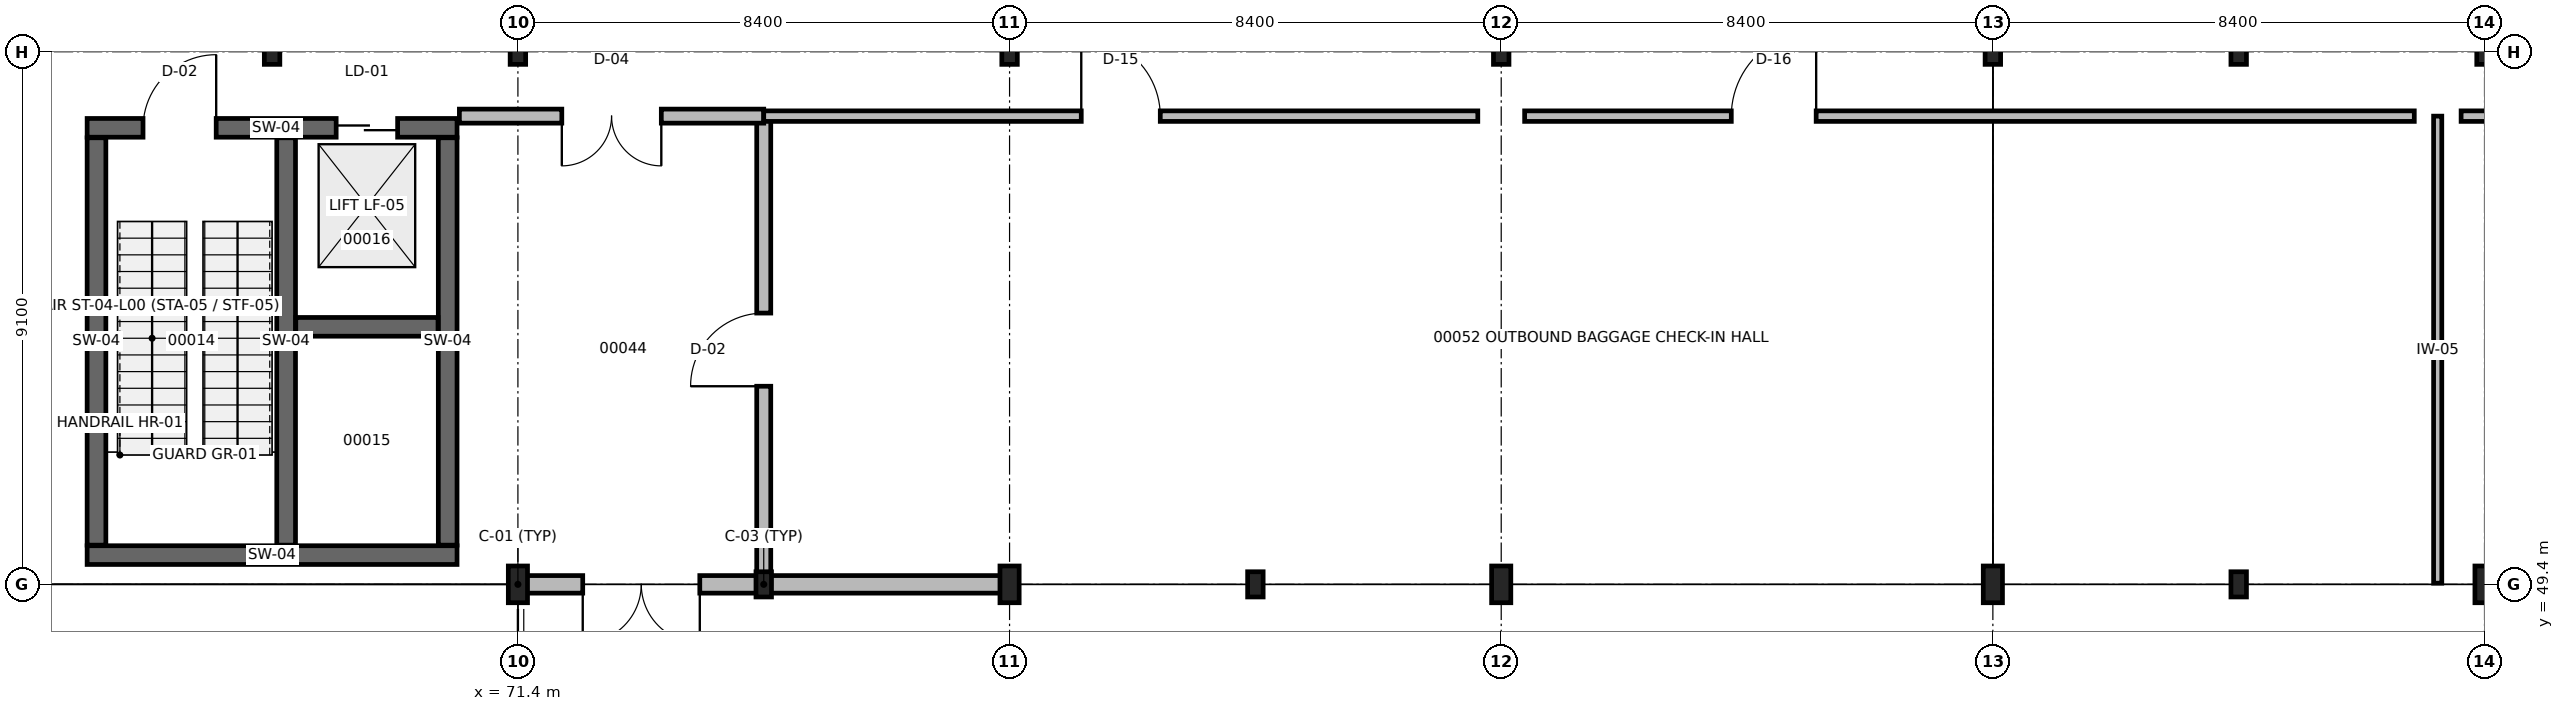
"""IFC4 building model, lengths in metres.
Left out: names, types, materials, properties, quantities, classifications, styles, units other than length and angle.
Written with IfcOpenShell. Run it as: python <this file> out.ifc"""

import sys

from ifc_helpers import new_model, si_unit, direction, frame, frame_2d, origin, origin_2d, place, context, subcontext, project, spatial, rectangle, i_section, extrude, element, fill, save


model = new_model("IFC4")
c1 = context("Model", 3, precision=1e-05, world=origin(), true_north=direction((0.0, 1.0)))
c2 = subcontext(c1, "Body", "Model", "MODEL_VIEW")
j1 = project(units=[si_unit("LENGTHUNIT", "METRE"), si_unit("PLANEANGLEUNIT", "RADIAN")], contexts=[c1])
p1 = place(None, origin())
s1 = spatial("IfcSite", under=j1, at=p1, CompositionType="ELEMENT")
p2 = place(p1, origin())
s2 = spatial("IfcBuilding", under=s1, at=p2, CompositionType="ELEMENT")
p3 = place(p2, origin())
s3 = spatial("IfcBuildingStorey", under=s2, at=p3, CompositionType="ELEMENT", Elevation=0.0)
p4 = place(p3, frame((71.4, 49.4, 0.0), z_axis=(0.0, 0.0, 1.0), x_axis=(1.0, 0.0, 0.0)))
e1 = element("IfcColumn", 1, at=p4, inside=s3, PredefinedType="COLUMN", context=c2, shape_type="SweptSolid", body=[
    extrude(i_section(OverallWidth=0.328, OverallDepth=0.628, WebThickness=0.017, FlangeThickness=0.028, at=origin_2d()), origin(), (0.0, 0.0, 1.0), 5.1),
])
p5 = place(p3, frame((71.4, 58.5, 0.0), z_axis=(0.0, 0.0, 1.0), x_axis=(1.0, 0.0, 0.0)))
e2 = element("IfcColumn", 2, at=p5, inside=s3, PredefinedType="COLUMN", context=c2, shape_type="SweptSolid", body=[
    extrude(i_section(OverallWidth=0.265, OverallDepth=0.431, WebThickness=0.015, FlangeThickness=0.025, at=origin_2d()), origin(), (0.0, 0.0, 1.0), 5.1),
])
p6 = place(p3, frame((79.8, 49.4, 0.0), z_axis=(0.0, 0.0, 1.0), x_axis=(1.0, 0.0, 0.0)))
e3 = element("IfcColumn", 3, at=p6, inside=s3, PredefinedType="COLUMN", context=c2, shape_type="SweptSolid", body=[
    extrude(i_section(OverallWidth=0.328, OverallDepth=0.628, WebThickness=0.017, FlangeThickness=0.028, at=origin_2d()), origin(), (0.0, 0.0, 1.0), 5.1),
])
p7 = place(p3, frame((79.8, 58.5, 0.0), z_axis=(0.0, 0.0, 1.0), x_axis=(1.0, 0.0, 0.0)))
e4 = element("IfcColumn", 4, at=p7, inside=s3, PredefinedType="COLUMN", context=c2, shape_type="SweptSolid", body=[
    extrude(i_section(OverallWidth=0.265, OverallDepth=0.431, WebThickness=0.015, FlangeThickness=0.025, at=origin_2d()), origin(), (0.0, 0.0, 1.0), 5.1),
])
p8 = place(p3, frame((88.2, 49.4, 0.0), z_axis=(0.0, 0.0, 1.0), x_axis=(1.0, 0.0, 0.0)))
e5 = element("IfcColumn", 5, at=p8, inside=s3, PredefinedType="COLUMN", context=c2, shape_type="SweptSolid", body=[
    extrude(i_section(OverallWidth=0.328, OverallDepth=0.628, WebThickness=0.017, FlangeThickness=0.028, at=origin_2d()), origin(), (0.0, 0.0, 1.0), 5.1),
])
p9 = place(p3, frame((88.2, 58.5, 0.0), z_axis=(0.0, 0.0, 1.0), x_axis=(1.0, 0.0, 0.0)))
e6 = element("IfcColumn", 6, at=p9, inside=s3, PredefinedType="COLUMN", context=c2, shape_type="SweptSolid", body=[
    extrude(i_section(OverallWidth=0.265, OverallDepth=0.431, WebThickness=0.015, FlangeThickness=0.025, at=origin_2d()), origin(), (0.0, 0.0, 1.0), 5.1),
])
p10 = place(p3, frame((96.6, 49.4, 0.0), z_axis=(0.0, 0.0, 1.0), x_axis=(1.0, 0.0, 0.0)))
e7 = element("IfcColumn", 7, at=p10, inside=s3, PredefinedType="COLUMN", context=c2, shape_type="SweptSolid", body=[
    extrude(i_section(OverallWidth=0.328, OverallDepth=0.628, WebThickness=0.017, FlangeThickness=0.028, at=origin_2d()), origin(), (0.0, 0.0, 1.0), 5.1),
])
p11 = place(p3, frame((96.6, 58.5, 0.0), z_axis=(0.0, 0.0, 1.0), x_axis=(1.0, 0.0, 0.0)))
e8 = element("IfcColumn", 8, at=p11, inside=s3, PredefinedType="COLUMN", context=c2, shape_type="SweptSolid", body=[
    extrude(i_section(OverallWidth=0.265, OverallDepth=0.431, WebThickness=0.015, FlangeThickness=0.025, at=origin_2d()), origin(), (0.0, 0.0, 1.0), 5.1),
])
p12 = place(p3, frame((105.0, 49.4, 0.0), z_axis=(0.0, 0.0, 1.0), x_axis=(1.0, 0.0, 0.0)))
e9 = element("IfcColumn", 9, at=p12, inside=s3, PredefinedType="COLUMN", context=c2, shape_type="SweptSolid", body=[
    extrude(i_section(OverallWidth=0.328, OverallDepth=0.628, WebThickness=0.017, FlangeThickness=0.028, at=origin_2d()), origin(), (0.0, 0.0, 1.0), 5.1),
])
for number, where, z_axis, x_axis in (
    (10, (105.0, 58.5, 0.0), (0.0, 0.0, 1.0), (1.0, 0.0, 0.0)),
    (11, (67.2, 58.5, 0.0), (0.0, 0.0, 1.0), (1.0, 0.0, 0.0)),
    (12, (75.6, 49.4, 0.0), (0.0, 0.0, 1.0), (1.0, 0.0, 0.0)),
    (13, (84.0, 49.4, 0.0), (0.0, 0.0, 1.0), (1.0, 0.0, 0.0)),
    (14, (100.8, 49.4, 0.0), (0.0, 0.0, 1.0), (1.0, 0.0, 0.0)),
    (15, (100.8, 58.5, 0.0), (0.0, 0.0, 1.0), (1.0, 0.0, 0.0)),
):
    element("IfcColumn", number, at=place(p3, frame(where, z_axis=z_axis, x_axis=x_axis)), inside=s3, PredefinedType="COLUMN", context=c2, shape_type="SweptSolid", body=[
        extrude(i_section(OverallWidth=0.265, OverallDepth=0.431, WebThickness=0.015, FlangeThickness=0.025, at=origin_2d()), origin(), (0.0, 0.0, 1.0), 5.1),
    ])
p13 = place(p3, frame((79.785, 49.4, 0.0), z_axis=(0.0, 0.0, 1.0), x_axis=(-1.0, 0.0, 0.0)))
e16 = element("IfcWall", 16, at=p13, inside=s3, PredefinedType="SOLIDWALL", context=c2, shape_type="SweptSolid", body=[
    extrude(rectangle(XDim=8.37, YDim=0.3, at=frame_2d((4.185, 0.0))), origin(), (0.0, 0.0, 1.0), 4.258),
])
p14 = place(p13, frame((5.278, 0.0, 0.0)))
e17 = element("IfcOpeningElement", 17, at=p14, cuts=e16, PredefinedType="OPENING", context=c2, shape_type="SweptSolid", body=[
    extrude(rectangle(XDim=2.0, YDim=2.4, at=frame_2d((1.0, 1.2))), frame((0.0, 0.16, 0.0), z_axis=(0.0, -1.0, 0.0), x_axis=(1.0, 0.0, 0.0)), (0.0, 0.0, 1.0), 0.32),
])
p15 = place(p3, frame((64.04, 49.9, 0.0), z_axis=(0.0, 0.0, 1.0), x_axis=(1.0, 0.0, 0.0)))
e18 = element("IfcWall", 18, at=p15, inside=s3, PredefinedType="SHEAR", context=c2, shape_type="SweptSolid", body=[
    extrude(rectangle(XDim=6.32, YDim=0.32, at=frame_2d((3.16, 0.0))), origin(), (0.0, 0.0, 1.0), 4.82),
])
p16 = place(p3, frame((64.04, 57.2, 0.0), z_axis=(0.0, 0.0, 1.0), x_axis=(1.0, 0.0, 0.0)))
e19 = element("IfcWall", 19, at=p16, inside=s3, PredefinedType="SHEAR", context=c2, shape_type="SweptSolid", body=[
    extrude(rectangle(XDim=6.32, YDim=0.32, at=frame_2d((3.16, 0.0))), origin(), (0.0, 0.0, 1.0), 4.82),
])
p17 = place(p16, frame((0.955, 0.0, 0.0)))
e20 = element("IfcOpeningElement", 20, at=p17, cuts=e19, PredefinedType="OPENING", context=c2, shape_type="SweptSolid", body=[
    extrude(rectangle(XDim=1.25, YDim=2.2, at=frame_2d((0.625, 1.1))), frame((0.0, 0.17, 0.0), z_axis=(0.0, -1.0, 0.0), x_axis=(1.0, 0.0, 0.0)), (0.0, 0.0, 1.0), 0.34),
])
p18 = place(p16, frame((4.255, 0.0, 0.0)))
e21 = element("IfcOpeningElement", 21, at=p18, cuts=e19, PredefinedType="OPENING", context=c2, shape_type="SweptSolid", body=[
    extrude(rectangle(XDim=1.05, YDim=2.15, at=frame_2d((0.525, 1.075))), frame((0.0, 0.17, 0.0), z_axis=(0.0, -1.0, 0.0), x_axis=(1.0, 0.0, 0.0)), (0.0, 0.0, 1.0), 0.34),
])
for number, where, z_axis, x_axis in (
    (22, (64.2, 50.07, 0.0), (0.0, 0.0, 1.0), (0.0, 1.0, 0.0)),
    (23, (70.2, 50.07, 0.0), (0.0, 0.0, 1.0), (0.0, 1.0, 0.0)),
    (24, (67.44, 50.07, 0.0), (0.0, 0.0, 1.0), (0.0, 1.0, 0.0)),
):
    element("IfcWall", number, at=place(p3, frame(where, z_axis=z_axis, x_axis=x_axis)), inside=s3, PredefinedType="SHEAR", context=c2, shape_type="SweptSolid", body=[
        extrude(rectangle(XDim=6.96, YDim=0.32, at=frame_2d((3.48, 0.0))), origin(), (0.0, 0.0, 1.0), 4.82),
    ])
p19 = place(p3, frame((67.605, 53.8, 0.0), z_axis=(0.0, 0.0, 1.0), x_axis=(1.0, 0.0, 0.0)))
e25 = element("IfcWall", 25, at=p19, inside=s3, PredefinedType="SHEAR", context=c2, shape_type="SweptSolid", body=[
    extrude(rectangle(XDim=2.43, YDim=0.32, at=frame_2d((1.215, 0.0))), origin(), (0.0, 0.0, 1.0), 4.82),
])
p20 = place(p3, frame((75.6, 49.42, 0.0), z_axis=(0.0, 0.0, 1.0), x_axis=(0.0, 1.0, 0.0)))
e26 = element("IfcWall", 26, at=p20, inside=s3, PredefinedType="SOLIDWALL", context=c2, shape_type="SweptSolid", body=[
    extrude(rectangle(XDim=7.98, YDim=0.24, at=frame_2d((3.99, 0.0))), origin(), (0.0, 0.0, 1.0), 4.258),
])
p21 = place(p20, frame((3.365, 0.0, 0.0)))
e27 = element("IfcOpeningElement", 27, at=p21, cuts=e26, PredefinedType="OPENING", context=c2, shape_type="SweptSolid", body=[
    extrude(rectangle(XDim=1.25, YDim=2.2, at=frame_2d((0.625, 1.1))), frame((0.0, 0.13, 0.0), z_axis=(0.0, -1.0, 0.0), x_axis=(1.0, 0.0, 0.0)), (0.0, 0.0, 1.0), 0.26),
])
p22 = place(p3, frame((70.4, 57.4, 0.0), z_axis=(0.0, 0.0, 1.0), x_axis=(1.0, 0.0, 0.0)))
e28 = element("IfcWall", 28, at=p22, inside=s3, PredefinedType="SOLIDWALL", context=c2, shape_type="SweptSolid", body=[
    extrude(rectangle(XDim=5.2, YDim=0.24, at=frame_2d((2.6, 0.0))), origin(), (0.0, 0.0, 1.0), 4.102),
])
p23 = place(p22, frame((1.75, 0.0, 0.0)))
e29 = element("IfcOpeningElement", 29, at=p23, cuts=e28, PredefinedType="OPENING", context=c2, shape_type="SweptSolid", body=[
    extrude(rectangle(XDim=1.7, YDim=2.25, at=frame_2d((0.85, 1.125))), frame((0.0, 0.13, 0.0), z_axis=(0.0, -1.0, 0.0), x_axis=(1.0, 0.0, 0.0)), (0.0, 0.0, 1.0), 0.26),
])
p24 = place(p3, frame((75.6, 57.4, 0.0), z_axis=(0.0, 0.0, 1.0), x_axis=(1.0, 0.0, 0.0)))
e30 = element("IfcWall", 30, at=p24, inside=s3, PredefinedType="PARTITIONING", context=c2, shape_type="SweptSolid", body=[
    extrude(rectangle(XDim=12.2, YDim=0.18, at=frame_2d((6.1, 0.0))), origin(), (0.0, 0.0, 1.0), 4.102),
])
p25 = place(p24, frame((5.425, 0.0, 0.0)))
e31 = element("IfcOpeningElement", 31, at=p25, cuts=e30, PredefinedType="OPENING", context=c2, shape_type="SweptSolid", body=[
    extrude(rectangle(XDim=1.35, YDim=2.2, at=frame_2d((0.675, 1.1))), frame((0.0, 0.1, 0.0), z_axis=(0.0, -1.0, 0.0), x_axis=(1.0, 0.0, 0.0)), (0.0, 0.0, 1.0), 0.2),
])
p26 = place(p3, frame((88.6, 57.4, 0.0), z_axis=(0.0, 0.0, 1.0), x_axis=(1.0, 0.0, 0.0)))
e32 = element("IfcWall", 32, at=p26, inside=s3, PredefinedType="PARTITIONING", context=c2, shape_type="SweptSolid", body=[
    extrude(rectangle(XDim=15.2, YDim=0.18, at=frame_2d((7.6, 0.0))), origin(), (0.0, 0.0, 1.0), 4.102),
])
p27 = place(p26, frame((3.531, 0.0, 0.0)))
e33 = element("IfcOpeningElement", 33, at=p27, cuts=e32, PredefinedType="OPENING", context=c2, shape_type="SweptSolid", body=[
    extrude(rectangle(XDim=1.45, YDim=2.25, at=frame_2d((0.725, 1.125))), frame((0.0, 0.1, 0.0), z_axis=(0.0, -1.0, 0.0), x_axis=(1.0, 0.0, 0.0)), (0.0, 0.0, 1.0), 0.2),
])
p28 = place(p3, frame((104.6, 57.4, 0.0), z_axis=(0.0, 0.0, 1.0), x_axis=(1.0, 0.0, 0.0)))
e34 = element("IfcWall", 34, at=p28, inside=s3, PredefinedType="PARTITIONING", context=c2, shape_type="SweptSolid", body=[
    extrude(rectangle(XDim=16.8, YDim=0.18, at=frame_2d((8.4, 0.0))), origin(), (0.0, 0.0, 1.0), 4.102),
])
p29 = place(p28, frame((9.945, 0.0, 0.0)))
e35 = element("IfcOpeningElement", 35, at=p29, cuts=e34, PredefinedType="OPENING", context=c2, shape_type="SweptSolid", body=[
    extrude(rectangle(XDim=1.95, YDim=2.35, at=frame_2d((0.975, 1.175))), frame((0.0, 0.1, 0.0), z_axis=(0.0, -1.0, 0.0), x_axis=(1.0, 0.0, 0.0)), (0.0, 0.0, 1.0), 0.2),
])
p30 = place(p3, frame((104.2, 49.42, 0.0), z_axis=(0.0, 0.0, 1.0), x_axis=(0.0, 1.0, 0.0)))
e36 = element("IfcWall", 36, at=p30, inside=s3, PredefinedType="PARTITIONING", context=c2, shape_type="SweptSolid", body=[
    extrude(rectangle(XDim=7.98, YDim=0.14, at=frame_2d((3.99, 0.0))), origin(), (0.0, 0.0, 1.0), 4.72),
])
p31 = place(p14, origin())
e37 = element("IfcDoor", 37, at=p31, inside=s3, OperationType="DOUBLE_DOOR_SINGLE_SWING", PredefinedType="DOOR", context=c2, shape_type="SweptSolid", body=[
    extrude(rectangle(XDim=2.0, YDim=2.4, at=frame_2d((1.0, 1.2))), frame((0.0, 0.025, 0.0), z_axis=(0.0, -1.0, 0.0), x_axis=(1.0, 0.0, 0.0)), (0.0, 0.0, 1.0), 0.05),
])
fill(e17, e37)
p32 = place(p17, origin())
e38 = element("IfcDoor", 38, at=p32, inside=s3, OperationType="SINGLE_SWING_RIGHT", PredefinedType="DOOR", context=c2, shape_type="SweptSolid", body=[
    extrude(rectangle(XDim=1.25, YDim=2.2, at=frame_2d((0.625, 1.1))), frame((0.0, 0.025, 0.0), z_axis=(0.0, -1.0, 0.0), x_axis=(1.0, 0.0, 0.0)), (0.0, 0.0, 1.0), 0.05),
])
fill(e20, e38)
p33 = place(p18, origin())
e39 = element("IfcDoor", 39, at=p33, inside=s3, OperationType="DOUBLE_DOOR_SLIDING", PredefinedType="DOOR", context=c2, shape_type="SweptSolid", body=[
    extrude(rectangle(XDim=1.05, YDim=2.15, at=frame_2d((0.525, 1.075))), frame((0.0, 0.025, 0.0), z_axis=(0.0, -1.0, 0.0), x_axis=(1.0, 0.0, 0.0)), (0.0, 0.0, 1.0), 0.05),
])
fill(e21, e39)
p34 = place(p21, frame((1.25, 0.0, 0.0), z_axis=(0.0, 0.0, 1.0), x_axis=(-1.0, 0.0, 0.0)))
e40 = element("IfcDoor", 40, at=p34, inside=s3, OperationType="SINGLE_SWING_RIGHT", PredefinedType="DOOR", context=c2, shape_type="SweptSolid", body=[
    extrude(rectangle(XDim=1.25, YDim=2.2, at=frame_2d((0.625, 1.1))), frame((0.0, 0.025, 0.0), z_axis=(0.0, -1.0, 0.0), x_axis=(1.0, 0.0, 0.0)), (0.0, 0.0, 1.0), 0.05),
])
fill(e27, e40)
p35 = place(p23, frame((1.7, 0.0, 0.0), z_axis=(0.0, 0.0, 1.0), x_axis=(-1.0, 0.0, 0.0)))
e41 = element("IfcDoor", 41, at=p35, inside=s3, OperationType="DOUBLE_DOOR_SINGLE_SWING", PredefinedType="DOOR", context=c2, shape_type="SweptSolid", body=[
    extrude(rectangle(XDim=1.7, YDim=2.25, at=frame_2d((0.85, 1.125))), frame((0.0, 0.025, 0.0), z_axis=(0.0, -1.0, 0.0), x_axis=(1.0, 0.0, 0.0)), (0.0, 0.0, 1.0), 0.05),
])
fill(e29, e41)
p36 = place(p25, origin())
e42 = element("IfcDoor", 42, at=p36, inside=s3, OperationType="SINGLE_SWING_LEFT", PredefinedType="DOOR", context=c2, shape_type="SweptSolid", body=[
    extrude(rectangle(XDim=1.35, YDim=2.2, at=frame_2d((0.675, 1.1))), frame((0.0, 0.025, 0.0), z_axis=(0.0, -1.0, 0.0), x_axis=(1.0, 0.0, 0.0)), (0.0, 0.0, 1.0), 0.05),
])
fill(e31, e42)
p37 = place(p27, origin())
e43 = element("IfcDoor", 43, at=p37, inside=s3, OperationType="SINGLE_SWING_RIGHT", PredefinedType="DOOR", context=c2, shape_type="SweptSolid", body=[
    extrude(rectangle(XDim=1.45, YDim=2.25, at=frame_2d((0.725, 1.125))), frame((0.0, 0.025, 0.0), z_axis=(0.0, -1.0, 0.0), x_axis=(1.0, 0.0, 0.0)), (0.0, 0.0, 1.0), 0.05),
])
fill(e33, e43)
save(model, sys.argv[1])
